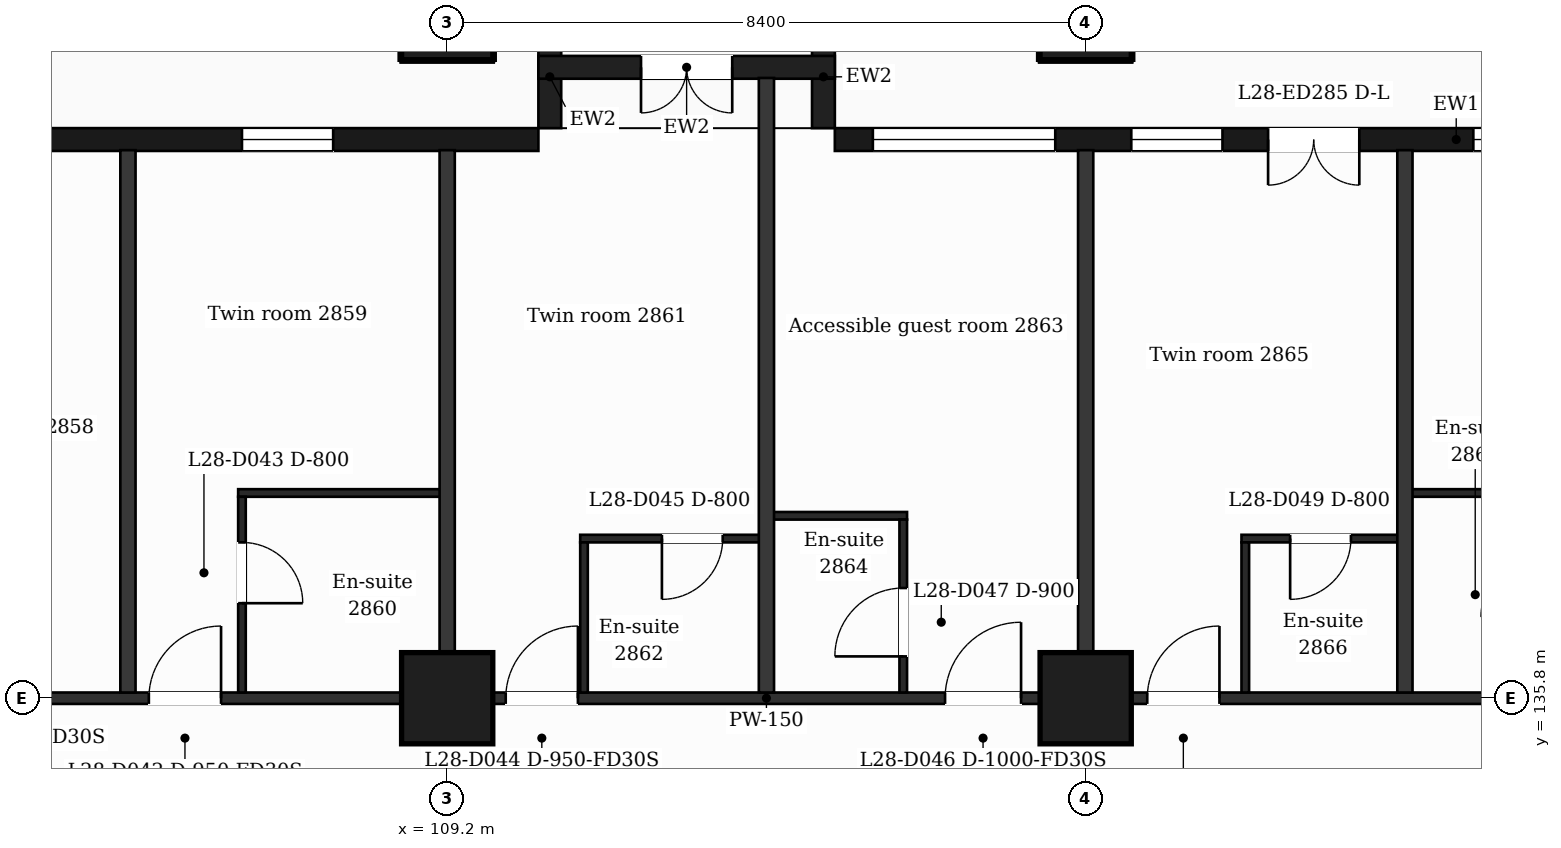
"""IFC4 building model, lengths in metres.
Left out: names, types, materials, properties, quantities, classifications, styles, units other than length and angle.
Written with IfcOpenShell. Run it as: python <this file> out.ifc"""

import sys

from ifc_helpers import new_model, si_unit, direction, frame, frame_2d, origin, origin_2d, place, context, subcontext, project, spatial, rectangle, extrude, element, fill, save


model = new_model("IFC4")
c1 = context("Model", 3, precision=1e-05, world=origin(), true_north=direction((0.0, 1.0)))
c2 = subcontext(c1, "Body", "Model", "MODEL_VIEW")
j1 = project(units=[si_unit("LENGTHUNIT", "METRE"), si_unit("PLANEANGLEUNIT", "RADIAN")], contexts=[c1])
p1 = place(None, origin())
s1 = spatial("IfcSite", under=j1, at=p1, CompositionType="ELEMENT")
p2 = place(p1, origin())
s2 = spatial("IfcBuilding", under=s1, at=p2, CompositionType="ELEMENT")
p3 = place(p2, frame((0.0, 0.0, 120.6)))
s3 = spatial("IfcBuildingStorey", under=s2, at=p3, CompositionType="ELEMENT", Elevation=120.6)
for number, where, z_axis, x_axis in (
    (1, (109.2, 135.8, 0.0), (0.0, 0.0, 1.0), (1.0, 0.0, 0.0)),
    (2, (117.6, 135.8, 0.0), (0.0, 0.0, 1.0), (1.0, 0.0, 0.0)),
    (3, (109.2, 144.8, 0.0), (0.0, 0.0, 1.0), (1.0, 0.0, 0.0)),
    (4, (117.6, 144.8, 0.0), (0.0, 0.0, 1.0), (1.0, 0.0, 0.0)),
):
    element("IfcColumn", number, at=place(p3, frame(where, z_axis=z_axis, x_axis=x_axis)), inside=s3, PredefinedType="COLUMN", context=c2, shape_type="SweptSolid", body=[
        extrude(rectangle(XDim=1.2, YDim=1.2, at=origin_2d()), origin(), (0.0, 0.0, 1.0), 3.7),
    ])
p4 = place(p3, frame((130.65, 143.15, 0.0), z_axis=(0.0, 0.0, 1.0), x_axis=(-1.0, 0.0, 0.0)))
e5 = element("IfcWall", 5, at=p4, inside=s3, PredefinedType="SOLIDWALL", context=c2, shape_type="SweptSolid", body=[
    extrude(rectangle(XDim=16.35, YDim=0.3, at=frame_2d((8.175, 0.0))), origin(), (0.0, 0.0, 1.0), 3.38),
])
p5 = place(p4, frame((1.35, 0.0, 0.9)))
e6 = element("IfcOpeningElement", 6, at=p5, cuts=e5, PredefinedType="OPENING", context=c2, shape_type="SweptSolid", body=[
    extrude(rectangle(XDim=2.4, YDim=2.1, at=frame_2d((1.2, 1.05))), frame((0.0, 0.16, 0.0), z_axis=(0.0, -1.0, 0.0), x_axis=(1.0, 0.0, 0.0)), (0.0, 0.0, 1.0), 0.32),
])
p6 = place(p4, frame((5.55, 0.0, 0.9)))
e7 = element("IfcOpeningElement", 7, at=p6, cuts=e5, PredefinedType="OPENING", context=c2, shape_type="SweptSolid", body=[
    extrude(rectangle(XDim=2.4, YDim=2.1, at=frame_2d((1.2, 1.05))), frame((0.0, 0.16, 0.0), z_axis=(0.0, -1.0, 0.0), x_axis=(1.0, 0.0, 0.0)), (0.0, 0.0, 1.0), 0.32),
])
p7 = place(p4, frame((9.45, 0.0, 0.0)))
e8 = element("IfcOpeningElement", 8, at=p7, cuts=e5, PredefinedType="OPENING", context=c2, shape_type="SweptSolid", body=[
    extrude(rectangle(XDim=1.2, YDim=2.4, at=frame_2d((0.6, 1.2))), frame((0.0, 0.16, 0.0), z_axis=(0.0, -1.0, 0.0), x_axis=(1.0, 0.0, 0.0)), (0.0, 0.0, 1.0), 0.32),
])
p8 = place(p4, frame((11.25, 0.0, 0.9)))
e9 = element("IfcOpeningElement", 9, at=p8, cuts=e5, PredefinedType="OPENING", context=c2, shape_type="SweptSolid", body=[
    extrude(rectangle(XDim=1.2, YDim=2.1, at=frame_2d((0.6, 1.05))), frame((0.0, 0.16, 0.0), z_axis=(0.0, -1.0, 0.0), x_axis=(1.0, 0.0, 0.0)), (0.0, 0.0, 1.0), 0.32),
])
p9 = place(p4, frame((13.45, 0.0, 0.9)))
e10 = element("IfcOpeningElement", 10, at=p9, cuts=e5, PredefinedType="OPENING", context=c2, shape_type="SweptSolid", body=[
    extrude(rectangle(XDim=2.4, YDim=2.1, at=frame_2d((1.2, 1.05))), frame((0.0, 0.16, 0.0), z_axis=(0.0, -1.0, 0.0), x_axis=(1.0, 0.0, 0.0)), (0.0, 0.0, 1.0), 0.32),
])
p10 = place(p3, frame((110.4, 143.15, 0.0), z_axis=(0.0, 0.0, 1.0), x_axis=(-1.0, 0.0, 0.0)))
e11 = element("IfcWall", 11, at=p10, inside=s3, PredefinedType="SOLIDWALL", context=c2, shape_type="SweptSolid", body=[
    extrude(rectangle(XDim=14.4, YDim=0.3, at=frame_2d((7.2, 0.0))), origin(), (0.0, 0.0, 1.0), 3.38),
])
p11 = place(p10, frame((2.7, 0.0, 0.9)))
e12 = element("IfcOpeningElement", 12, at=p11, cuts=e11, PredefinedType="OPENING", context=c2, shape_type="SweptSolid", body=[
    extrude(rectangle(XDim=1.2, YDim=2.1, at=frame_2d((0.6, 1.05))), frame((0.0, 0.16, 0.0), z_axis=(0.0, -1.0, 0.0), x_axis=(1.0, 0.0, 0.0)), (0.0, 0.0, 1.0), 0.32),
])
p12 = place(p10, frame((6.9, 0.0, 0.0)))
e13 = element("IfcOpeningElement", 13, at=p12, cuts=e11, PredefinedType="OPENING", context=c2, shape_type="SweptSolid", body=[
    extrude(rectangle(XDim=1.2, YDim=2.4, at=frame_2d((0.6, 1.2))), frame((0.0, 0.16, 0.0), z_axis=(0.0, -1.0, 0.0), x_axis=(1.0, 0.0, 0.0)), (0.0, 0.0, 1.0), 0.32),
])
p13 = place(p10, frame((10.5, 0.0, 0.9)))
e14 = element("IfcOpeningElement", 14, at=p13, cuts=e11, PredefinedType="OPENING", context=c2, shape_type="SweptSolid", body=[
    extrude(rectangle(XDim=2.4, YDim=2.1, at=frame_2d((1.2, 1.05))), frame((0.0, 0.16, 0.0), z_axis=(0.0, -1.0, 0.0), x_axis=(1.0, 0.0, 0.0)), (0.0, 0.0, 1.0), 0.32),
])
for number, where, z_axis, x_axis in (
    (15, (114.15, 143.3, 0.0), (0.0, 0.0, 1.0), (0.0, 1.0, 0.0)),
    (16, (110.55, 143.3, 0.0), (0.0, 0.0, 1.0), (0.0, 1.0, 0.0)),
):
    element("IfcWall", number, at=place(p3, frame(where, z_axis=z_axis, x_axis=x_axis)), inside=s3, PredefinedType="SOLIDWALL", context=c2, shape_type="SweptSolid", body=[
        extrude(rectangle(XDim=1.35, YDim=0.3, at=frame_2d((0.675, 0.0))), origin(), (0.0, 0.0, 1.0), 3.38),
    ])
p14 = place(p3, frame((114.3, 144.1, 0.0), z_axis=(0.0, 0.0, 1.0), x_axis=(-1.0, 0.0, 0.0)))
e17 = element("IfcWall", 17, at=p14, inside=s3, PredefinedType="SOLIDWALL", context=c2, shape_type="SweptSolid", body=[
    extrude(rectangle(XDim=3.9, YDim=0.3, at=frame_2d((1.95, 0.0))), origin(), (0.0, 0.0, 1.0), 3.38),
])
p15 = place(p14, frame((1.35, 0.0, 0.0)))
e18 = element("IfcOpeningElement", 18, at=p15, cuts=e17, PredefinedType="OPENING", context=c2, shape_type="SweptSolid", body=[
    extrude(rectangle(XDim=1.2, YDim=2.4, at=frame_2d((0.6, 1.2))), frame((0.0, 0.16, 0.0), z_axis=(0.0, -1.0, 0.0), x_axis=(1.0, 0.0, 0.0)), (0.0, 0.0, 1.0), 0.32),
])
p16 = place(p3, frame((90.895, 135.8, 0.0), z_axis=(0.0, 0.0, 1.0), x_axis=(1.0, 0.0, 0.0)))
e19 = element("IfcWall", 19, at=p16, inside=s3, PredefinedType="PARTITIONING", context=c2, shape_type="SweptSolid", body=[
    extrude(rectangle(XDim=45.011, YDim=0.15, at=frame_2d((22.505, 0.0))), origin(), (0.0, 0.0, 1.0), 3.38),
])
p17 = place(p16, frame((8.005, 0.0, 0.0)))
e20 = element("IfcOpeningElement", 20, at=p17, cuts=e19, PredefinedType="OPENING", context=c2, shape_type="SweptSolid", body=[
    extrude(rectangle(XDim=1.0, YDim=2.1, at=frame_2d((0.5, 1.05))), frame((0.0, 0.085, 0.0), z_axis=(0.0, -1.0, 0.0), x_axis=(1.0, 0.0, 0.0)), (0.0, 0.0, 1.0), 0.17),
])
p18 = place(p16, frame((11.785, 0.0, 0.0)))
e21 = element("IfcOpeningElement", 21, at=p18, cuts=e19, PredefinedType="OPENING", context=c2, shape_type="SweptSolid", body=[
    extrude(rectangle(XDim=0.95, YDim=2.1, at=frame_2d((0.475, 1.05))), frame((0.0, 0.085, 0.0), z_axis=(0.0, -1.0, 0.0), x_axis=(1.0, 0.0, 0.0)), (0.0, 0.0, 1.0), 0.17),
])
p19 = place(p16, frame((14.38, 0.0, 0.0)))
e22 = element("IfcOpeningElement", 22, at=p19, cuts=e19, PredefinedType="OPENING", context=c2, shape_type="SweptSolid", body=[
    extrude(rectangle(XDim=0.95, YDim=2.1, at=frame_2d((0.475, 1.05))), frame((0.0, 0.085, 0.0), z_axis=(0.0, -1.0, 0.0), x_axis=(1.0, 0.0, 0.0)), (0.0, 0.0, 1.0), 0.17),
])
p20 = place(p16, frame((19.075, 0.0, 0.0)))
e23 = element("IfcOpeningElement", 23, at=p20, cuts=e19, PredefinedType="OPENING", context=c2, shape_type="SweptSolid", body=[
    extrude(rectangle(XDim=0.95, YDim=2.1, at=frame_2d((0.475, 1.05))), frame((0.0, 0.085, 0.0), z_axis=(0.0, -1.0, 0.0), x_axis=(1.0, 0.0, 0.0)), (0.0, 0.0, 1.0), 0.17),
])
p21 = place(p16, frame((24.855, 0.0, 0.0)))
e24 = element("IfcOpeningElement", 24, at=p21, cuts=e19, PredefinedType="OPENING", context=c2, shape_type="SweptSolid", body=[
    extrude(rectangle(XDim=1.0, YDim=2.1, at=frame_2d((0.5, 1.05))), frame((0.0, 0.085, 0.0), z_axis=(0.0, -1.0, 0.0), x_axis=(1.0, 0.0, 0.0)), (0.0, 0.0, 1.0), 0.17),
])
p22 = place(p16, frame((27.515, 0.0, 0.0)))
e25 = element("IfcOpeningElement", 25, at=p22, cuts=e19, PredefinedType="OPENING", context=c2, shape_type="SweptSolid", body=[
    extrude(rectangle(XDim=0.95, YDim=2.1, at=frame_2d((0.475, 1.05))), frame((0.0, 0.085, 0.0), z_axis=(0.0, -1.0, 0.0), x_axis=(1.0, 0.0, 0.0)), (0.0, 0.0, 1.0), 0.17),
])
p23 = place(p16, frame((33.242, 0.0, 0.0)))
e26 = element("IfcOpeningElement", 26, at=p23, cuts=e19, PredefinedType="OPENING", context=c2, shape_type="SweptSolid", body=[
    extrude(rectangle(XDim=0.95, YDim=2.1, at=frame_2d((0.475, 1.05))), frame((0.0, 0.085, 0.0), z_axis=(0.0, -1.0, 0.0), x_axis=(1.0, 0.0, 0.0)), (0.0, 0.0, 1.0), 0.17),
])
p24 = place(p16, frame((39.814, 0.0, 0.0)))
e27 = element("IfcOpeningElement", 27, at=p24, cuts=e19, PredefinedType="OPENING", context=c2, shape_type="SweptSolid", body=[
    extrude(rectangle(XDim=0.95, YDim=2.1, at=frame_2d((0.475, 1.05))), frame((0.0, 0.085, 0.0), z_axis=(0.0, -1.0, 0.0), x_axis=(1.0, 0.0, 0.0)), (0.0, 0.0, 1.0), 0.17),
])
p25 = place(p3, frame((110.95, 137.9, 0.0), z_axis=(0.0, 0.0, 1.0), x_axis=(1.0, 0.0, 0.0)))
e28 = element("IfcWall", 28, at=p25, inside=s3, PredefinedType="PARTITIONING", context=c2, shape_type="SweptSolid", body=[
    extrude(rectangle(XDim=2.45, YDim=0.1, at=frame_2d((1.225, 0.0))), origin(), (0.0, 0.0, 1.0), 3.38),
])
p26 = place(p25, frame((1.075, 0.0, 0.0)))
e29 = element("IfcOpeningElement", 29, at=p26, cuts=e28, PredefinedType="OPENING", context=c2, shape_type="SweptSolid", body=[
    extrude(rectangle(XDim=0.8, YDim=2.1, at=frame_2d((0.4, 1.05))), frame((0.0, 0.06, 0.0), z_axis=(0.0, -1.0, 0.0), x_axis=(1.0, 0.0, 0.0)), (0.0, 0.0, 1.0), 0.12),
])
p27 = place(p3, frame((119.65, 137.9, 0.0), z_axis=(0.0, 0.0, 1.0), x_axis=(1.0, 0.0, 0.0)))
e30 = element("IfcWall", 30, at=p27, inside=s3, PredefinedType="PARTITIONING", context=c2, shape_type="SweptSolid", body=[
    extrude(rectangle(XDim=2.15, YDim=0.1, at=frame_2d((1.075, 0.0))), origin(), (0.0, 0.0, 1.0), 3.38),
])
p28 = place(p27, frame((0.64, 0.0, 0.0)))
e31 = element("IfcOpeningElement", 31, at=p28, cuts=e30, PredefinedType="OPENING", context=c2, shape_type="SweptSolid", body=[
    extrude(rectangle(XDim=0.8, YDim=2.1, at=frame_2d((0.4, 1.05))), frame((0.0, 0.06, 0.0), z_axis=(0.0, -1.0, 0.0), x_axis=(1.0, 0.0, 0.0)), (0.0, 0.0, 1.0), 0.12),
])
p29 = place(p3, frame((113.4, 138.2, 0.0), z_axis=(0.0, 0.0, 1.0), x_axis=(1.0, 0.0, 0.0)))
e32 = element("IfcWall", 32, at=p29, inside=s3, PredefinedType="PARTITIONING", context=c2, shape_type="SweptSolid", body=[
    extrude(rectangle(XDim=1.85, YDim=0.1, at=frame_2d((0.925, 0.0))), origin(), (0.0, 0.0, 1.0), 3.38),
])
p30 = place(p3, frame((106.45, 138.5, 0.0), z_axis=(0.0, 0.0, 1.0), x_axis=(1.0, 0.0, 0.0)))
e33 = element("IfcWall", 33, at=p30, inside=s3, PredefinedType="PARTITIONING", context=c2, shape_type="SweptSolid", body=[
    extrude(rectangle(XDim=2.75, YDim=0.1, at=frame_2d((1.375, 0.0))), origin(), (0.0, 0.0, 1.0), 3.38),
])
p31 = place(p3, frame((121.8, 138.5, 0.0), z_axis=(0.0, 0.0, 1.0), x_axis=(1.0, 0.0, 0.0)))
e34 = element("IfcWall", 34, at=p31, inside=s3, PredefinedType="PARTITIONING", context=c2, shape_type="SweptSolid", body=[
    extrude(rectangle(XDim=1.85, YDim=0.1, at=frame_2d((0.925, 0.0))), origin(), (0.0, 0.0, 1.0), 3.38),
])
p32 = place(p3, frame((105.0, 135.875, 0.0), z_axis=(0.0, 0.0, 1.0), x_axis=(0.0, 1.0, 0.0)))
e35 = element("IfcWall", 35, at=p32, inside=s3, PredefinedType="PARTITIONING", context=c2, shape_type="SweptSolid", body=[
    extrude(rectangle(XDim=7.135, YDim=0.2, at=frame_2d((3.567, 0.0))), origin(), (0.0, 0.0, 1.0), 3.38),
])
p33 = place(p3, frame((106.5, 135.875, 0.0), z_axis=(0.0, 0.0, 1.0), x_axis=(0.0, 1.0, 0.0)))
e36 = element("IfcWall", 36, at=p33, inside=s3, PredefinedType="PARTITIONING", context=c2, shape_type="SweptSolid", body=[
    extrude(rectangle(XDim=2.575, YDim=0.1, at=frame_2d((1.288, 0.0))), origin(), (0.0, 0.0, 1.0), 3.38),
])
p34 = place(p33, frame((1.175, 0.0, 0.0)))
e37 = element("IfcOpeningElement", 37, at=p34, cuts=e36, PredefinedType="OPENING", context=c2, shape_type="SweptSolid", body=[
    extrude(rectangle(XDim=0.8, YDim=2.1, at=frame_2d((0.4, 1.05))), frame((0.0, 0.06, 0.0), z_axis=(0.0, -1.0, 0.0), x_axis=(1.0, 0.0, 0.0)), (0.0, 0.0, 1.0), 0.12),
])
p35 = place(p3, frame((109.2, 135.875, 0.0), z_axis=(0.0, 0.0, 1.0), x_axis=(0.0, 1.0, 0.0)))
e38 = element("IfcWall", 38, at=p35, inside=s3, PredefinedType="PARTITIONING", context=c2, shape_type="SweptSolid", body=[
    extrude(rectangle(XDim=7.135, YDim=0.2, at=frame_2d((3.567, 0.0))), origin(), (0.0, 0.0, 1.0), 3.38),
])
p36 = place(p3, frame((111.0, 135.875, 0.0), z_axis=(0.0, 0.0, 1.0), x_axis=(0.0, 1.0, 0.0)))
e39 = element("IfcWall", 39, at=p36, inside=s3, PredefinedType="PARTITIONING", context=c2, shape_type="SweptSolid", body=[
    extrude(rectangle(XDim=1.975, YDim=0.1, at=frame_2d((0.988, 0.0))), origin(), (0.0, 0.0, 1.0), 3.38),
])
p37 = place(p3, frame((113.4, 135.875, 0.0), z_axis=(0.0, 0.0, 1.0), x_axis=(0.0, 1.0, 0.0)))
e40 = element("IfcWall", 40, at=p37, inside=s3, PredefinedType="PARTITIONING", context=c2, shape_type="SweptSolid", body=[
    extrude(rectangle(XDim=8.085, YDim=0.2, at=frame_2d((4.042, 0.0))), origin(), (0.0, 0.0, 1.0), 3.38),
])
p38 = place(p3, frame((115.2, 135.875, 0.0), z_axis=(0.0, 0.0, 1.0), x_axis=(0.0, 1.0, 0.0)))
e41 = element("IfcWall", 41, at=p38, inside=s3, PredefinedType="PARTITIONING", context=c2, shape_type="SweptSolid", body=[
    extrude(rectangle(XDim=2.275, YDim=0.1, at=frame_2d((1.137, 0.0))), origin(), (0.0, 0.0, 1.0), 3.38),
])
p39 = place(p38, frame((0.475, 0.0, 0.0)))
e42 = element("IfcOpeningElement", 42, at=p39, cuts=e41, PredefinedType="OPENING", context=c2, shape_type="SweptSolid", body=[
    extrude(rectangle(XDim=0.9, YDim=2.1, at=frame_2d((0.45, 1.05))), frame((0.0, 0.06, 0.0), z_axis=(0.0, -1.0, 0.0), x_axis=(1.0, 0.0, 0.0)), (0.0, 0.0, 1.0), 0.12),
])
p40 = place(p3, frame((117.6, 135.875, 0.0), z_axis=(0.0, 0.0, 1.0), x_axis=(0.0, 1.0, 0.0)))
e43 = element("IfcWall", 43, at=p40, inside=s3, PredefinedType="PARTITIONING", context=c2, shape_type="SweptSolid", body=[
    extrude(rectangle(XDim=7.135, YDim=0.2, at=frame_2d((3.567, 0.0))), origin(), (0.0, 0.0, 1.0), 3.38),
])
p41 = place(p3, frame((119.7, 135.875, 0.0), z_axis=(0.0, 0.0, 1.0), x_axis=(0.0, 1.0, 0.0)))
e44 = element("IfcWall", 44, at=p41, inside=s3, PredefinedType="PARTITIONING", context=c2, shape_type="SweptSolid", body=[
    extrude(rectangle(XDim=1.975, YDim=0.1, at=frame_2d((0.988, 0.0))), origin(), (0.0, 0.0, 1.0), 3.38),
])
p42 = place(p3, frame((121.8, 135.875, 0.0), z_axis=(0.0, 0.0, 1.0), x_axis=(0.0, 1.0, 0.0)))
e45 = element("IfcWall", 45, at=p42, inside=s3, PredefinedType="PARTITIONING", context=c2, shape_type="SweptSolid", body=[
    extrude(rectangle(XDim=7.135, YDim=0.2, at=frame_2d((3.567, 0.0))), origin(), (0.0, 0.0, 1.0), 3.38),
])
p43 = place(p6, origin())
e46 = element("IfcWindow", 46, at=p43, inside=s3, PartitioningType="SINGLE_PANEL", PredefinedType="WINDOW", context=c2, shape_type="SweptSolid", body=[
    extrude(rectangle(XDim=2.4, YDim=2.1, at=frame_2d((1.2, 1.05))), frame((0.0, 0.03, 0.0), z_axis=(0.0, -1.0, 0.0), x_axis=(1.0, 0.0, 0.0)), (0.0, 0.0, 1.0), 0.06),
])
fill(e7, e46)
p44 = place(p7, origin())
e47 = element("IfcDoor", 47, at=p44, inside=s3, OperationType="DOUBLE_DOOR_SINGLE_SWING", PredefinedType="DOOR", context=c2, shape_type="SweptSolid", body=[
    extrude(rectangle(XDim=1.2, YDim=2.4, at=frame_2d((0.6, 1.2))), frame((0.0, 0.025, 0.0), z_axis=(0.0, -1.0, 0.0), x_axis=(1.0, 0.0, 0.0)), (0.0, 0.0, 1.0), 0.05),
])
fill(e8, e47)
p45 = place(p8, origin())
e48 = element("IfcWindow", 48, at=p45, inside=s3, PartitioningType="SINGLE_PANEL", PredefinedType="WINDOW", context=c2, shape_type="SweptSolid", body=[
    extrude(rectangle(XDim=1.2, YDim=2.1, at=frame_2d((0.6, 1.05))), frame((0.0, 0.03, 0.0), z_axis=(0.0, -1.0, 0.0), x_axis=(1.0, 0.0, 0.0)), (0.0, 0.0, 1.0), 0.06),
])
fill(e9, e48)
p46 = place(p9, origin())
e49 = element("IfcWindow", 49, at=p46, inside=s3, PartitioningType="SINGLE_PANEL", PredefinedType="WINDOW", context=c2, shape_type="SweptSolid", body=[
    extrude(rectangle(XDim=2.4, YDim=2.1, at=frame_2d((1.2, 1.05))), frame((0.0, 0.03, 0.0), z_axis=(0.0, -1.0, 0.0), x_axis=(1.0, 0.0, 0.0)), (0.0, 0.0, 1.0), 0.06),
])
fill(e10, e49)
p47 = place(p11, origin())
e50 = element("IfcWindow", 50, at=p47, inside=s3, PartitioningType="SINGLE_PANEL", PredefinedType="WINDOW", context=c2, shape_type="SweptSolid", body=[
    extrude(rectangle(XDim=1.2, YDim=2.1, at=frame_2d((0.6, 1.05))), frame((0.0, 0.03, 0.0), z_axis=(0.0, -1.0, 0.0), x_axis=(1.0, 0.0, 0.0)), (0.0, 0.0, 1.0), 0.06),
])
fill(e12, e50)
p48 = place(p15, origin())
e51 = element("IfcDoor", 51, at=p48, inside=s3, OperationType="DOUBLE_DOOR_SINGLE_SWING", PredefinedType="DOOR", context=c2, shape_type="SweptSolid", body=[
    extrude(rectangle(XDim=1.2, YDim=2.4, at=frame_2d((0.6, 1.2))), frame((0.0, 0.025, 0.0), z_axis=(0.0, -1.0, 0.0), x_axis=(1.0, 0.0, 0.0)), (0.0, 0.0, 1.0), 0.05),
])
fill(e18, e51)
p49 = place(p19, origin())
e52 = element("IfcDoor", 52, at=p49, inside=s3, OperationType="SINGLE_SWING_RIGHT", PredefinedType="DOOR", context=c2, shape_type="SweptSolid", body=[
    extrude(rectangle(XDim=0.95, YDim=2.1, at=frame_2d((0.475, 1.05))), frame((0.0, 0.025, 0.0), z_axis=(0.0, -1.0, 0.0), x_axis=(1.0, 0.0, 0.0)), (0.0, 0.0, 1.0), 0.05),
])
fill(e22, e52)
p50 = place(p34, origin())
e53 = element("IfcDoor", 53, at=p50, inside=s3, OperationType="SINGLE_SWING_LEFT", PredefinedType="DOOR", context=c2, shape_type="SweptSolid", body=[
    extrude(rectangle(XDim=0.8, YDim=2.1, at=frame_2d((0.4, 1.05))), frame((0.0, 0.025, 0.0), z_axis=(0.0, -1.0, 0.0), x_axis=(1.0, 0.0, 0.0)), (0.0, 0.0, 1.0), 0.05),
])
fill(e37, e53)
p51 = place(p20, origin())
e54 = element("IfcDoor", 54, at=p51, inside=s3, OperationType="SINGLE_SWING_RIGHT", PredefinedType="DOOR", context=c2, shape_type="SweptSolid", body=[
    extrude(rectangle(XDim=0.95, YDim=2.1, at=frame_2d((0.475, 1.05))), frame((0.0, 0.025, 0.0), z_axis=(0.0, -1.0, 0.0), x_axis=(1.0, 0.0, 0.0)), (0.0, 0.0, 1.0), 0.05),
])
fill(e23, e54)
p52 = place(p26, origin())
e55 = element("IfcDoor", 55, at=p52, inside=s3, OperationType="SINGLE_SWING_LEFT", PredefinedType="DOOR", context=c2, shape_type="SweptSolid", body=[
    extrude(rectangle(XDim=0.8, YDim=2.1, at=frame_2d((0.4, 1.05))), frame((0.0, 0.025, 0.0), z_axis=(0.0, -1.0, 0.0), x_axis=(1.0, 0.0, 0.0)), (0.0, 0.0, 1.0), 0.05),
])
fill(e29, e55)
p53 = place(p21, origin())
e56 = element("IfcDoor", 56, at=p53, inside=s3, OperationType="SINGLE_SWING_RIGHT", PredefinedType="DOOR", context=c2, shape_type="SweptSolid", body=[
    extrude(rectangle(XDim=1.0, YDim=2.1, at=frame_2d((0.5, 1.05))), frame((0.0, 0.025, 0.0), z_axis=(0.0, -1.0, 0.0), x_axis=(1.0, 0.0, 0.0)), (0.0, 0.0, 1.0), 0.05),
])
fill(e24, e56)
p54 = place(p39, origin())
e57 = element("IfcDoor", 57, at=p54, inside=s3, OperationType="SINGLE_SWING_LEFT", PredefinedType="DOOR", context=c2, shape_type="SweptSolid", body=[
    extrude(rectangle(XDim=0.9, YDim=2.1, at=frame_2d((0.45, 1.05))), frame((0.0, 0.025, 0.0), z_axis=(0.0, -1.0, 0.0), x_axis=(1.0, 0.0, 0.0)), (0.0, 0.0, 1.0), 0.05),
])
fill(e42, e57)
p55 = place(p22, origin())
e58 = element("IfcDoor", 58, at=p55, inside=s3, OperationType="SINGLE_SWING_RIGHT", PredefinedType="DOOR", context=c2, shape_type="SweptSolid", body=[
    extrude(rectangle(XDim=0.95, YDim=2.1, at=frame_2d((0.475, 1.05))), frame((0.0, 0.025, 0.0), z_axis=(0.0, -1.0, 0.0), x_axis=(1.0, 0.0, 0.0)), (0.0, 0.0, 1.0), 0.05),
])
fill(e25, e58)
p56 = place(p28, origin())
e59 = element("IfcDoor", 59, at=p56, inside=s3, OperationType="SINGLE_SWING_LEFT", PredefinedType="DOOR", context=c2, shape_type="SweptSolid", body=[
    extrude(rectangle(XDim=0.8, YDim=2.1, at=frame_2d((0.4, 1.05))), frame((0.0, 0.025, 0.0), z_axis=(0.0, -1.0, 0.0), x_axis=(1.0, 0.0, 0.0)), (0.0, 0.0, 1.0), 0.05),
])
fill(e31, e59)
save(model, sys.argv[1])
